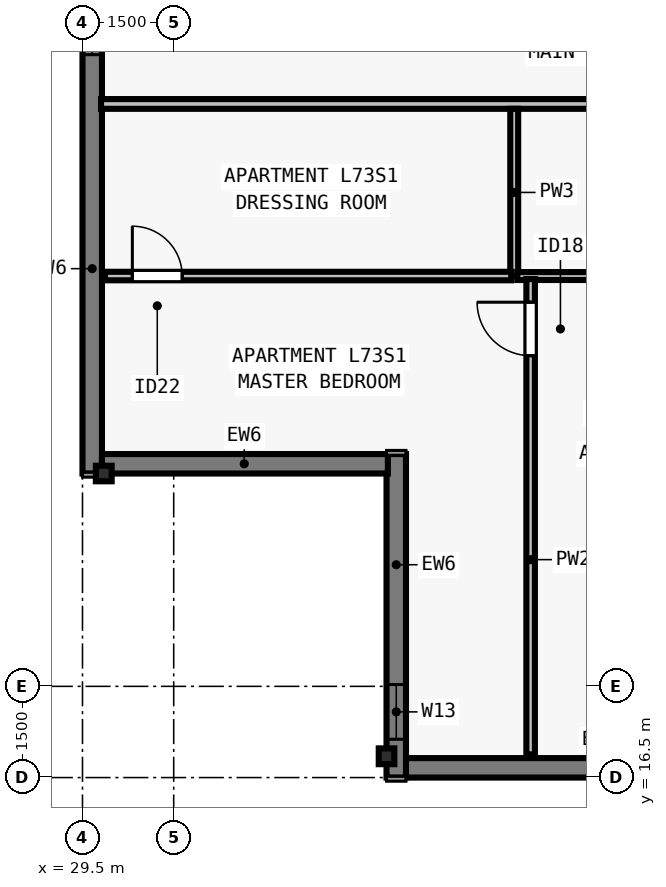
"""IFC4 building model, lengths in metres.
Left out: names, types, materials, properties, quantities, classifications, styles, units other than length and angle.
Written with IfcOpenShell. Run it as: python <this file> out.ifc"""

import sys

from ifc_helpers import new_model, si_unit, direction, frame, frame_2d, origin, origin_2d, place, context, subcontext, project, spatial, rectangle, i_section, extrude, element, fill, save


model = new_model("IFC4")
c1 = context("Model", 3, precision=1e-05, world=origin(), true_north=direction((0.0, 1.0)))
c2 = subcontext(c1, "Body", "Model", "MODEL_VIEW")
j1 = project(units=[si_unit("LENGTHUNIT", "METRE"), si_unit("PLANEANGLEUNIT", "RADIAN")], contexts=[c1])
p1 = place(None, origin())
s1 = spatial("IfcSite", under=j1, at=p1, CompositionType="ELEMENT")
p2 = place(p1, origin())
s2 = spatial("IfcBuilding", under=s1, at=p2, CompositionType="ELEMENT")
p3 = place(p2, frame((0.0, 0.0, 265.5)))
s3 = spatial("IfcBuildingStorey", under=s2, at=p3, CompositionType="ELEMENT", Elevation=265.5)
for number, where, z_axis, x_axis in (
    (1, (34.5, 16.85, 0.0), (0.0, 0.0, 1.0), (1.0, 0.0, 0.0)),
    (2, (29.85, 21.5, 0.0), (0.0, 0.0, 1.0), (0.0, 1.0, 0.0)),
):
    element("IfcColumn", number, at=place(p3, frame(where, z_axis=z_axis, x_axis=x_axis)), inside=s3, PredefinedType="COLUMN", context=c2, shape_type="SweptSolid", body=[
        extrude(i_section(OverallWidth=0.256, OverallDepth=0.26, WebThickness=0.01, FlangeThickness=0.017, FilletRadius=0.013, at=origin_2d()), origin(), (0.0, 0.0, 1.0), 3.5),
    ])
p4 = place(p3, frame((41.2, 16.66, 0.0), z_axis=(0.0, 0.0, 1.0), x_axis=(-1.0, 0.0, 0.0)))
e3 = element("IfcWall", 3, at=p4, inside=s3, PredefinedType="SOLIDWALL", context=c2, shape_type="SweptSolid", body=[
    extrude(rectangle(XDim=6.402, YDim=0.32, at=frame_2d((3.201, 0.0))), origin(), (0.0, 0.0, 1.0), 3.29),
])
p5 = place(p3, frame((34.66, 16.5, 0.0), z_axis=(0.0, 0.0, 1.0), x_axis=(0.0, 1.0, 0.0)))
e4 = element("IfcWall", 4, at=p5, inside=s3, PredefinedType="SOLIDWALL", context=c2, shape_type="SweptSolid", body=[
    extrude(rectangle(XDim=5.32, YDim=0.32, at=frame_2d((2.66, 0.0))), origin(), (0.0, 0.0, 1.0), 3.29),
])
p6 = place(p5, frame((0.63, 0.0, 0.8)))
e5 = element("IfcOpeningElement", 5, at=p6, cuts=e4, PredefinedType="OPENING", context=c2, shape_type="SweptSolid", body=[
    extrude(rectangle(XDim=0.9, YDim=1.678, at=frame_2d((0.45, 0.839))), frame((0.0, 0.17, 0.0), z_axis=(0.0, -1.0, 0.0), x_axis=(1.0, 0.0, 0.0)), (0.0, 0.0, 1.0), 0.34),
])
p7 = place(p3, frame((34.522, 21.66, 0.0), z_axis=(0.0, 0.0, 1.0), x_axis=(-1.0, 0.0, 0.0)))
e6 = element("IfcWall", 6, at=p7, inside=s3, PredefinedType="SOLIDWALL", context=c2, shape_type="SweptSolid", body=[
    extrude(rectangle(XDim=4.724, YDim=0.32, at=frame_2d((2.362, 0.0))), origin(), (0.0, 0.0, 1.0), 3.29),
])
p8 = place(p3, frame((29.66, 21.5, 0.0), z_axis=(0.0, 0.0, 1.0), x_axis=(0.0, 1.0, 0.0)))
e7 = element("IfcWall", 7, at=p8, inside=s3, PredefinedType="SOLIDWALL", context=c2, shape_type="SweptSolid", body=[
    extrude(rectangle(XDim=34.702, YDim=0.32, at=frame_2d((17.351, 0.0))), origin(), (0.0, 0.0, 1.0), 3.29),
])
p9 = place(p8, frame((6.888, 0.0, 0.8)))
e8 = element("IfcOpeningElement", 8, at=p9, cuts=e7, PredefinedType="OPENING", context=c2, shape_type="SweptSolid", body=[
    extrude(rectangle(XDim=1.55, YDim=1.678, at=frame_2d((0.775, 0.839))), frame((0.0, 0.17, 0.0), z_axis=(0.0, -1.0, 0.0), x_axis=(1.0, 0.0, 0.0)), (0.0, 0.0, 1.0), 0.34),
])
p10 = place(p8, frame((10.113, 0.0, 0.8)))
e9 = element("IfcOpeningElement", 9, at=p10, cuts=e7, PredefinedType="OPENING", context=c2, shape_type="SweptSolid", body=[
    extrude(rectangle(XDim=1.85, YDim=1.678, at=frame_2d((0.925, 0.839))), frame((0.0, 0.17, 0.0), z_axis=(0.0, -1.0, 0.0), x_axis=(1.0, 0.0, 0.0)), (0.0, 0.0, 1.0), 0.34),
])
p11 = place(p8, frame((14.888, 0.0, 0.8)))
e10 = element("IfcOpeningElement", 10, at=p11, cuts=e7, PredefinedType="OPENING", context=c2, shape_type="SweptSolid", body=[
    extrude(rectangle(XDim=1.55, YDim=1.678, at=frame_2d((0.775, 0.839))), frame((0.0, 0.17, 0.0), z_axis=(0.0, -1.0, 0.0), x_axis=(1.0, 0.0, 0.0)), (0.0, 0.0, 1.0), 0.34),
])
p12 = place(p8, frame((18.114, 0.0, 0.8)))
e11 = element("IfcOpeningElement", 11, at=p12, cuts=e7, PredefinedType="OPENING", context=c2, shape_type="SweptSolid", body=[
    extrude(rectangle(XDim=1.85, YDim=1.678, at=frame_2d((0.925, 0.839))), frame((0.0, 0.17, 0.0), z_axis=(0.0, -1.0, 0.0), x_axis=(1.0, 0.0, 0.0)), (0.0, 0.0, 1.0), 0.34),
])
p13 = place(p8, frame((23.614, 0.0, 0.8)))
e12 = element("IfcOpeningElement", 12, at=p13, cuts=e7, PredefinedType="OPENING", context=c2, shape_type="SweptSolid", body=[
    extrude(rectangle(XDim=1.85, YDim=1.678, at=frame_2d((0.925, 0.839))), frame((0.0, 0.17, 0.0), z_axis=(0.0, -1.0, 0.0), x_axis=(1.0, 0.0, 0.0)), (0.0, 0.0, 1.0), 0.34),
])
p14 = place(p8, frame((29.24, 0.0, 0.8)))
e13 = element("IfcOpeningElement", 13, at=p14, cuts=e7, PredefinedType="OPENING", context=c2, shape_type="SweptSolid", body=[
    extrude(rectangle(XDim=1.55, YDim=1.678, at=frame_2d((0.775, 0.839))), frame((0.0, 0.17, 0.0), z_axis=(0.0, -1.0, 0.0), x_axis=(1.0, 0.0, 0.0)), (0.0, 0.0, 1.0), 0.34),
])
p15 = place(p3, frame((29.805, 27.577, 0.0), z_axis=(0.0, 0.0, 1.0), x_axis=(1.0, 0.0, 0.0)))
e14 = element("IfcWall", 14, at=p15, inside=s3, PredefinedType="PARTITIONING", context=c2, shape_type="SweptSolid", body=[
    extrude(rectangle(XDim=44.39, YDim=0.16, at=frame_2d((22.195, 0.0))), origin(), (0.0, 0.0, 1.0), 2.958),
])
p16 = place(p15, frame((10.415, 0.0, 0.0)))
e15 = element("IfcOpeningElement", 15, at=p16, cuts=e14, PredefinedType="OPENING", context=c2, shape_type="SweptSolid", body=[
    extrude(rectangle(XDim=0.96, YDim=2.18, at=frame_2d((0.48, 1.09))), frame((0.0, 0.09, 0.0), z_axis=(0.0, -1.0, 0.0), x_axis=(1.0, 0.0, 0.0)), (0.0, 0.0, 1.0), 0.18),
])
p17 = place(p15, frame((32.495, 0.0, 0.0)))
e16 = element("IfcOpeningElement", 16, at=p17, cuts=e14, PredefinedType="OPENING", context=c2, shape_type="SweptSolid", body=[
    extrude(rectangle(XDim=0.96, YDim=2.18, at=frame_2d((0.48, 1.09))), frame((0.0, 0.09, 0.0), z_axis=(0.0, -1.0, 0.0), x_axis=(1.0, 0.0, 0.0)), (0.0, 0.0, 1.0), 0.18),
])
p18 = place(p3, frame((36.6, 24.748, 0.0), z_axis=(0.0, 0.0, 1.0), x_axis=(0.0, 1.0, 0.0)))
e17 = element("IfcWall", 17, at=p18, inside=s3, PredefinedType="PLUMBINGWALL", context=c2, shape_type="SweptSolid", body=[
    extrude(rectangle(XDim=2.75, YDim=0.13, at=frame_2d((1.375, 0.0))), origin(), (0.0, 0.0, 1.0), 3.29),
])
p19 = place(p3, frame((36.65, 24.748, 0.0), z_axis=(0.0, 0.0, 1.0), x_axis=(1.0, 0.0, 0.0)))
e18 = element("IfcWall", 18, at=p19, inside=s3, PredefinedType="PLUMBINGWALL", context=c2, shape_type="SweptSolid", body=[
    extrude(rectangle(XDim=2.85, YDim=0.13, at=frame_2d((1.425, 0.0))), origin(), (0.0, 0.0, 1.0), 3.29),
])
p20 = place(p3, frame((36.87, 16.88, 0.0), z_axis=(0.0, 0.0, 1.0), x_axis=(0.0, 1.0, 0.0)))
e19 = element("IfcWall", 19, at=p20, inside=s3, PredefinedType="PARTITIONING", context=c2, shape_type="SweptSolid", body=[
    extrude(rectangle(XDim=7.818, YDim=0.14, at=frame_2d((3.909, 0.0))), origin(), (0.0, 0.0, 1.0), 2.573),
])
p21 = place(p20, frame((6.558, 0.0, 0.0)))
e20 = element("IfcOpeningElement", 20, at=p21, cuts=e19, PredefinedType="OPENING", context=c2, shape_type="SweptSolid", body=[
    extrude(rectangle(XDim=0.88, YDim=2.1, at=frame_2d((0.44, 1.05))), frame((0.0, 0.08, 0.0), z_axis=(0.0, -1.0, 0.0), x_axis=(1.0, 0.0, 0.0)), (0.0, 0.0, 1.0), 0.16),
])
p22 = place(p3, frame((29.87, 24.748, 0.0), z_axis=(0.0, 0.0, 1.0), x_axis=(1.0, 0.0, 0.0)))
e21 = element("IfcWall", 21, at=p22, inside=s3, PredefinedType="PARTITIONING", context=c2, shape_type="SweptSolid", body=[
    extrude(rectangle(XDim=6.68, YDim=0.14, at=frame_2d((3.34, 0.0))), origin(), (0.0, 0.0, 1.0), 2.958),
])
p23 = place(p22, frame((0.45, 0.0, 0.0)))
e22 = element("IfcOpeningElement", 22, at=p23, cuts=e21, PredefinedType="OPENING", context=c2, shape_type="SweptSolid", body=[
    extrude(rectangle(XDim=0.82, YDim=2.1, at=frame_2d((0.41, 1.05))), frame((0.0, 0.08, 0.0), z_axis=(0.0, -1.0, 0.0), x_axis=(1.0, 0.0, 0.0)), (0.0, 0.0, 1.0), 0.16),
])
p24 = place(p9, origin())
e23 = element("IfcWindow", 23, at=p24, inside=s3, PartitioningType="SINGLE_PANEL", PredefinedType="WINDOW", context=c2, shape_type="SweptSolid", body=[
    extrude(rectangle(XDim=1.55, YDim=1.678, at=frame_2d((0.775, 0.839))), frame((0.0, -0.05, 0.0), z_axis=(0.0, -1.0, 0.0), x_axis=(1.0, 0.0, 0.0)), (0.0, 0.0, 1.0), 0.06),
])
fill(e8, e23)
p25 = place(p6, origin())
e24 = element("IfcWindow", 24, at=p25, inside=s3, PartitioningType="SINGLE_PANEL", PredefinedType="WINDOW", context=c2, shape_type="SweptSolid", body=[
    extrude(rectangle(XDim=0.9, YDim=1.678, at=frame_2d((0.45, 0.839))), frame((0.0, -0.04, 0.0), z_axis=(0.0, -1.0, 0.0), x_axis=(1.0, 0.0, 0.0)), (0.0, 0.0, 1.0), 0.06),
])
fill(e5, e24)
p26 = place(p23, origin())
e25 = element("IfcDoor", 25, at=p26, inside=s3, OperationType="SINGLE_SWING_LEFT", PredefinedType="DOOR", context=c2, shape_type="SweptSolid", body=[
    extrude(rectangle(XDim=0.82, YDim=2.1, at=frame_2d((0.41, 1.05))), frame((0.0, 0.025, 0.0), z_axis=(0.0, -1.0, 0.0), x_axis=(1.0, 0.0, 0.0)), (0.0, 0.0, 1.0), 0.05),
])
fill(e22, e25)
p27 = place(p21, origin())
e26 = element("IfcDoor", 26, at=p27, inside=s3, OperationType="SINGLE_SWING_RIGHT", PredefinedType="DOOR", context=c2, shape_type="SweptSolid", body=[
    extrude(rectangle(XDim=0.88, YDim=2.1, at=frame_2d((0.44, 1.05))), frame((0.0, 0.025, 0.0), z_axis=(0.0, -1.0, 0.0), x_axis=(1.0, 0.0, 0.0)), (0.0, 0.0, 1.0), 0.05),
])
fill(e20, e26)
save(model, sys.argv[1])
